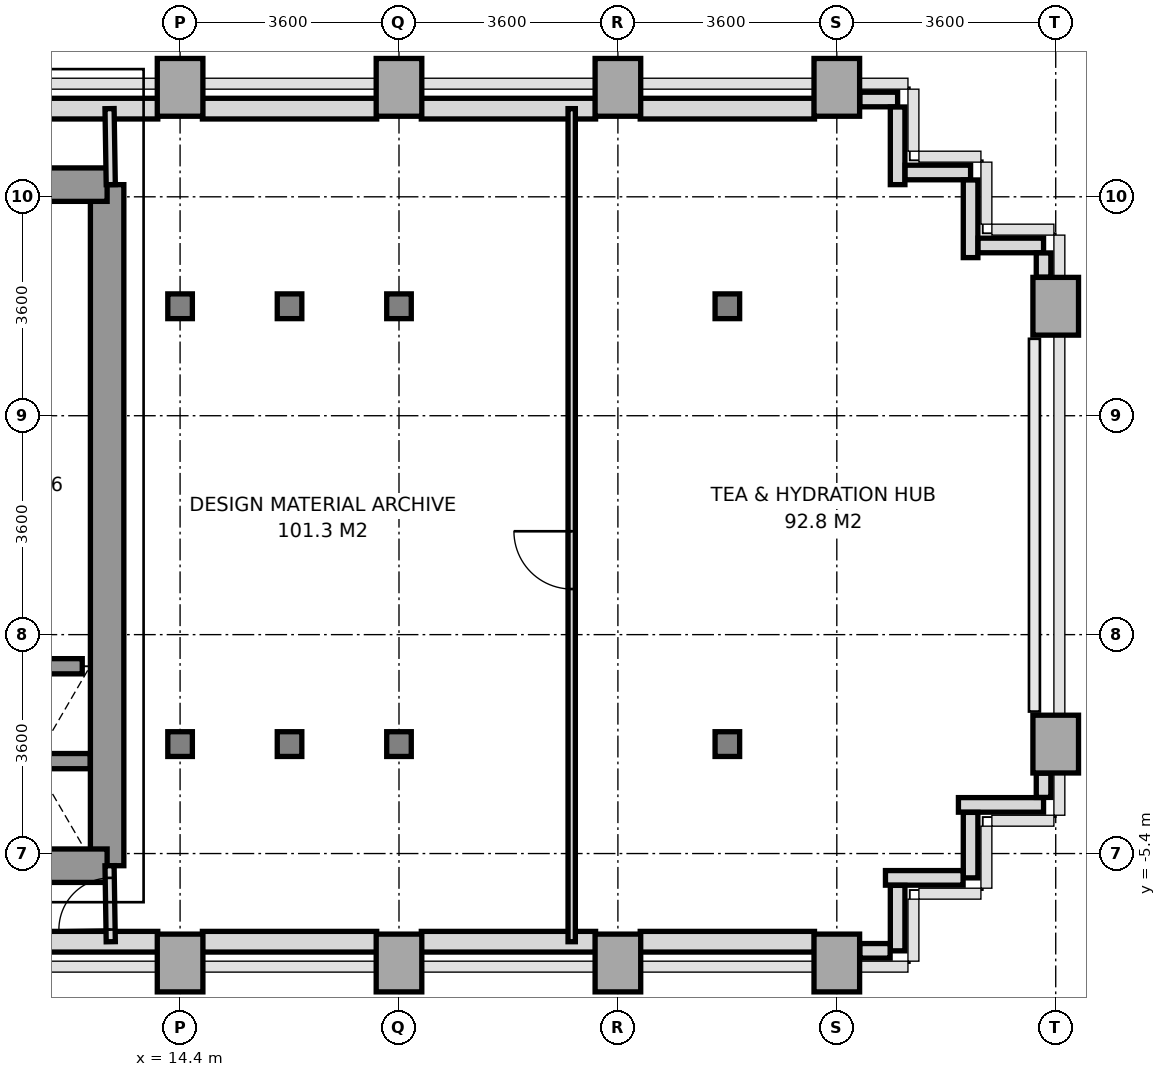
"""IFC4 building model, lengths in metres.
Left out: names, types, materials, properties, quantities, classifications, styles, units other than length and angle.
Written with IfcOpenShell. Run it as: python <this file> out.ifc"""

import sys

from ifc_helpers import new_model, si_unit, direction, frame, frame_2d, origin, origin_2d, place, context, subcontext, project, spatial, rectangle, i_section, extrude, source, transform, mapped, element, fill, save


model = new_model("IFC4")
c1 = context("Model", 3, precision=1e-05, world=origin(), true_north=direction((0.0, 1.0)))
c2 = subcontext(c1, "Body", "Model", "MODEL_VIEW")
j1 = project(units=[si_unit("LENGTHUNIT", "METRE"), si_unit("PLANEANGLEUNIT", "RADIAN")], contexts=[c1])
p1 = place(None, origin())
s1 = spatial("IfcSite", under=j1, at=p1, CompositionType="ELEMENT")
p2 = place(p1, origin())
s2 = spatial("IfcBuilding", under=s1, at=p2, CompositionType="ELEMENT")
p3 = place(p2, frame((0.0, 0.0, 54.4)))
s3 = spatial("IfcBuildingStorey", under=s2, at=p3, CompositionType="ELEMENT", Elevation=54.4)
m1 = source(origin(), c2, "Body", "SweptSolid", [
    extrude(rectangle(XDim=0.75, YDim=0.95, at=origin_2d()), origin(), (0.0, 0.0, 1.0), 3.2),
])
p4 = place(p3, frame((14.4, -7.2, 0.0), z_axis=(0.0, 0.0, 1.0), x_axis=(1.0, 0.0, 0.0)))
e1 = element("IfcColumn", 1, at=p4, inside=s3, PredefinedType="COLUMN", context=c2, shape_type="MappedRepresentation", body=[
    mapped(m1, transform((0.0, 0.0, 0.0), x_axis=(1.0, 0.0, 0.0), y_axis=(0.0, 1.0, 0.0), z_axis=(0.0, 0.0, 1.0), scale=1.0)),
])
m2 = source(origin(), c2, "Body", "SweptSolid", [
    extrude(i_section(OverallWidth=0.404, OverallDepth=0.407, WebThickness=0.022, FlangeThickness=0.035, at=origin_2d()), origin(), (0.0, 0.0, 1.0), 3.2),
])
for number, where, z_axis, x_axis in (
    (2, (14.4, -3.6, 0.0), (0.0, 0.0, 1.0), (1.0, 0.0, 0.0)),
    (3, (14.4, 3.6, 0.0), (0.0, 0.0, 1.0), (1.0, 0.0, 0.0)),
):
    element("IfcColumn", number, at=place(p3, frame(where, z_axis=z_axis, x_axis=x_axis)), inside=s3, PredefinedType="COLUMN", context=c2, shape_type="MappedRepresentation", body=[
        mapped(m2, transform((0.0, 0.0, 0.0), x_axis=(1.0, 0.0, 0.0), y_axis=(0.0, 1.0, 0.0), z_axis=(0.0, 0.0, 1.0), scale=1.0)),
    ])
p5 = place(p3, frame((14.4, 7.2, 0.0), z_axis=(0.0, 0.0, 1.0), x_axis=(1.0, 0.0, 0.0)))
e4 = element("IfcColumn", 4, at=p5, inside=s3, PredefinedType="COLUMN", context=c2, shape_type="MappedRepresentation", body=[
    mapped(m1, transform((0.0, 0.0, 0.0), x_axis=(1.0, 0.0, 0.0), y_axis=(0.0, 1.0, 0.0), z_axis=(0.0, 0.0, 1.0), scale=1.0)),
])
for number, where, z_axis, x_axis in (
    (5, (16.2, -3.6, 0.0), (0.0, 0.0, 1.0), (1.0, 0.0, 0.0)),
    (6, (16.2, 3.6, 0.0), (0.0, 0.0, 1.0), (1.0, 0.0, 0.0)),
):
    element("IfcColumn", number, at=place(p3, frame(where, z_axis=z_axis, x_axis=x_axis)), inside=s3, PredefinedType="COLUMN", context=c2, shape_type="MappedRepresentation", body=[
        mapped(m2, transform((0.0, 0.0, 0.0), x_axis=(1.0, 0.0, 0.0), y_axis=(0.0, 1.0, 0.0), z_axis=(0.0, 0.0, 1.0), scale=1.0)),
    ])
p6 = place(p3, frame((18.0, -7.2, 0.0), z_axis=(0.0, 0.0, 1.0), x_axis=(1.0, 0.0, 0.0)))
e7 = element("IfcColumn", 7, at=p6, inside=s3, PredefinedType="COLUMN", context=c2, shape_type="MappedRepresentation", body=[
    mapped(m1, transform((0.0, 0.0, 0.0), x_axis=(1.0, 0.0, 0.0), y_axis=(0.0, 1.0, 0.0), z_axis=(0.0, 0.0, 1.0), scale=1.0)),
])
for number, where, z_axis, x_axis in (
    (8, (18.0, -3.6, 0.0), (0.0, 0.0, 1.0), (1.0, 0.0, 0.0)),
    (9, (18.0, 3.6, 0.0), (0.0, 0.0, 1.0), (1.0, 0.0, 0.0)),
):
    element("IfcColumn", number, at=place(p3, frame(where, z_axis=z_axis, x_axis=x_axis)), inside=s3, PredefinedType="COLUMN", context=c2, shape_type="MappedRepresentation", body=[
        mapped(m2, transform((0.0, 0.0, 0.0), x_axis=(1.0, 0.0, 0.0), y_axis=(0.0, 1.0, 0.0), z_axis=(0.0, 0.0, 1.0), scale=1.0)),
    ])
for number, where, z_axis, x_axis in (
    (10, (18.0, 7.2, 0.0), (0.0, 0.0, 1.0), (1.0, 0.0, 0.0)),
    (11, (21.6, -7.2, 0.0), (0.0, 0.0, 1.0), (1.0, 0.0, 0.0)),
    (12, (21.6, 7.2, 0.0), (0.0, 0.0, 1.0), (1.0, 0.0, 0.0)),
):
    element("IfcColumn", number, at=place(p3, frame(where, z_axis=z_axis, x_axis=x_axis)), inside=s3, PredefinedType="COLUMN", context=c2, shape_type="MappedRepresentation", body=[
        mapped(m1, transform((0.0, 0.0, 0.0), x_axis=(1.0, 0.0, 0.0), y_axis=(0.0, 1.0, 0.0), z_axis=(0.0, 0.0, 1.0), scale=1.0)),
    ])
for number, where, z_axis, x_axis in (
    (13, (23.4, -3.6, 0.0), (0.0, 0.0, 1.0), (1.0, 0.0, 0.0)),
    (14, (23.4, 3.6, 0.0), (0.0, 0.0, 1.0), (1.0, 0.0, 0.0)),
):
    element("IfcColumn", number, at=place(p3, frame(where, z_axis=z_axis, x_axis=x_axis)), inside=s3, PredefinedType="COLUMN", context=c2, shape_type="MappedRepresentation", body=[
        mapped(m2, transform((0.0, 0.0, 0.0), x_axis=(1.0, 0.0, 0.0), y_axis=(0.0, 1.0, 0.0), z_axis=(0.0, 0.0, 1.0), scale=1.0)),
    ])
for number, where, z_axis, x_axis in (
    (15, (25.2, -7.2, 0.0), (0.0, 0.0, 1.0), (1.0, 0.0, 0.0)),
    (16, (25.2, 7.2, 0.0), (0.0, 0.0, 1.0), (1.0, 0.0, 0.0)),
    (17, (28.8, -3.6, 0.0), (0.0, 0.0, 1.0), (1.0, 0.0, 0.0)),
    (18, (28.8, 3.6, 0.0), (0.0, 0.0, 1.0), (1.0, 0.0, 0.0)),
):
    element("IfcColumn", number, at=place(p3, frame(where, z_axis=z_axis, x_axis=x_axis)), inside=s3, PredefinedType="COLUMN", context=c2, shape_type="MappedRepresentation", body=[
        mapped(m1, transform((0.0, 0.0, 0.0), x_axis=(1.0, 0.0, 0.0), y_axis=(0.0, 1.0, 0.0), z_axis=(0.0, 0.0, 1.0), scale=1.0)),
    ])
p7 = place(p3, frame((11.498, 6.85, 0.0), z_axis=(0.0, 0.0, 1.0), x_axis=(1.0, 0.0, 0.0)))
e19 = element("IfcWall", 19, at=p7, inside=s3, PredefinedType="SOLIDWALL", context=c2, shape_type="SweptSolid", body=[
    extrude(rectangle(XDim=2.535, YDim=0.34, at=frame_2d((1.268, 0.0))), origin(), (0.0, 0.0, 1.0), 3.2),
])
for number, where, z_axis, x_axis in (
    (20, (14.767, 6.85, 0.0), (0.0, 0.0, 1.0), (1.0, 0.0, 0.0)),
    (21, (18.367, 6.85, 0.0), (0.0, 0.0, 1.0), (1.0, 0.0, 0.0)),
    (22, (21.967, 6.85, 0.0), (0.0, 0.0, 1.0), (1.0, 0.0, 0.0)),
):
    element("IfcWall", number, at=place(p3, frame(where, z_axis=z_axis, x_axis=x_axis)), inside=s3, PredefinedType="SOLIDWALL", context=c2, shape_type="SweptSolid", body=[
        extrude(rectangle(XDim=2.866, YDim=0.34, at=frame_2d((1.433, 0.0))), origin(), (0.0, 0.0, 1.0), 2.45),
    ])
p8 = place(p3, frame((11.75, -6.85, 0.0), z_axis=(0.0, 0.0, 1.0), x_axis=(1.0, 0.0, 0.0)))
e23 = element("IfcWall", 23, at=p8, inside=s3, PredefinedType="SOLIDWALL", context=c2, shape_type="SweptSolid", body=[
    extrude(rectangle(XDim=2.283, YDim=0.34, at=frame_2d((1.142, 0.0))), origin(), (0.0, 0.0, 1.0), 3.2),
])
for number, where, z_axis, x_axis in (
    (24, (14.767, -6.85, 0.0), (0.0, 0.0, 1.0), (1.0, 0.0, 0.0)),
    (25, (18.367, -6.85, 0.0), (0.0, 0.0, 1.0), (1.0, 0.0, 0.0)),
    (26, (21.967, -6.85, 0.0), (0.0, 0.0, 1.0), (1.0, 0.0, 0.0)),
):
    element("IfcWall", number, at=place(p3, frame(where, z_axis=z_axis, x_axis=x_axis)), inside=s3, PredefinedType="SOLIDWALL", context=c2, shape_type="SweptSolid", body=[
        extrude(rectangle(XDim=2.866, YDim=0.34, at=frame_2d((1.433, 0.0))), origin(), (0.0, 0.0, 1.0), 2.45),
    ])
p9 = place(p3, frame((28.6, -4.6, 0.0), z_axis=(0.0, 0.0, 1.0), x_axis=(-1.0, 0.0, 0.0)))
e27 = element("IfcWall", 27, at=p9, inside=s3, PredefinedType="PARAPET", context=c2, shape_type="SweptSolid", body=[
    extrude(rectangle(XDim=1.4, YDim=0.24, at=frame_2d((0.7, 0.0))), origin(), (0.0, 0.0, 1.0), 1.15),
])
p10 = place(p3, frame((27.4, -4.723, 0.0), z_axis=(0.0, 0.0, 1.0), x_axis=(0.0, -1.0, 0.0)))
e28 = element("IfcWall", 28, at=p10, inside=s3, PredefinedType="PARAPET", context=c2, shape_type="SweptSolid", body=[
    extrude(rectangle(XDim=1.077, YDim=0.24, at=frame_2d((0.539, 0.0))), origin(), (0.0, 0.0, 1.0), 1.15),
])
p11 = place(p3, frame((27.277, -5.8, 0.0), z_axis=(0.0, 0.0, 1.0), x_axis=(-1.0, 0.0, 0.0)))
e29 = element("IfcWall", 29, at=p11, inside=s3, PredefinedType="PARAPET", context=c2, shape_type="SweptSolid", body=[
    extrude(rectangle(XDim=1.277, YDim=0.24, at=frame_2d((0.639, 0.0))), origin(), (0.0, 0.0, 1.0), 1.15),
])
p12 = place(p3, frame((26.2, -5.923, 0.0), z_axis=(0.0, 0.0, 1.0), x_axis=(0.0, -1.0, 0.0)))
e30 = element("IfcWall", 30, at=p12, inside=s3, PredefinedType="PARAPET", context=c2, shape_type="SweptSolid", body=[
    extrude(rectangle(XDim=1.077, YDim=0.24, at=frame_2d((0.539, 0.0))), origin(), (0.0, 0.0, 1.0), 1.15),
])
p13 = place(p3, frame((26.077, -7.0, 0.0), z_axis=(0.0, 0.0, 1.0), x_axis=(-1.0, 0.0, 0.0)))
e31 = element("IfcWall", 31, at=p13, inside=s3, PredefinedType="PARAPET", context=c2, shape_type="SweptSolid", body=[
    extrude(rectangle(XDim=0.499, YDim=0.24, at=frame_2d((0.25, 0.0))), origin(), (0.0, 0.0, 1.0), 1.15),
])
p14 = place(p3, frame((25.578, 7.0, 0.0), z_axis=(0.0, 0.0, 1.0), x_axis=(1.0, 0.0, 0.0)))
e32 = element("IfcWall", 32, at=p14, inside=s3, PredefinedType="PARAPET", context=c2, shape_type="SweptSolid", body=[
    extrude(rectangle(XDim=0.622, YDim=0.24, at=frame_2d((0.311, 0.0))), origin(), (0.0, 0.0, 1.0), 1.15),
])
p15 = place(p3, frame((26.2, 6.877, 0.0), z_axis=(0.0, 0.0, 1.0), x_axis=(0.0, -1.0, 0.0)))
e33 = element("IfcWall", 33, at=p15, inside=s3, PredefinedType="PARAPET", context=c2, shape_type="SweptSolid", body=[
    extrude(rectangle(XDim=1.277, YDim=0.24, at=frame_2d((0.638, 0.0))), origin(), (0.0, 0.0, 1.0), 1.15),
])
p16 = place(p3, frame((26.323, 5.8, 0.0), z_axis=(0.0, 0.0, 1.0), x_axis=(1.0, 0.0, 0.0)))
e34 = element("IfcWall", 34, at=p16, inside=s3, PredefinedType="PARAPET", context=c2, shape_type="SweptSolid", body=[
    extrude(rectangle(XDim=1.077, YDim=0.24, at=frame_2d((0.539, 0.0))), origin(), (0.0, 0.0, 1.0), 1.15),
])
p17 = place(p3, frame((27.4, 5.677, 0.0), z_axis=(0.0, 0.0, 1.0), x_axis=(0.0, -1.0, 0.0)))
e35 = element("IfcWall", 35, at=p17, inside=s3, PredefinedType="PARAPET", context=c2, shape_type="SweptSolid", body=[
    extrude(rectangle(XDim=1.277, YDim=0.24, at=frame_2d((0.639, 0.0))), origin(), (0.0, 0.0, 1.0), 1.15),
])
p18 = place(p3, frame((27.523, 4.6, 0.0), z_axis=(0.0, 0.0, 1.0), x_axis=(1.0, 0.0, 0.0)))
e36 = element("IfcWall", 36, at=p18, inside=s3, PredefinedType="PARAPET", context=c2, shape_type="SweptSolid", body=[
    extrude(rectangle(XDim=1.077, YDim=0.24, at=frame_2d((0.539, 0.0))), origin(), (0.0, 0.0, 1.0), 1.15),
])
for number, where, z_axis, x_axis in (
    (37, (28.6, 4.477, 0.0), (0.0, 0.0, 1.0), (0.0, -1.0, 0.0)),
    (38, (28.6, -4.078, 0.0), (0.0, 0.0, 1.0), (0.0, -1.0, 0.0)),
):
    element("IfcWall", number, at=place(p3, frame(where, z_axis=z_axis, x_axis=x_axis)), inside=s3, PredefinedType="PARAPET", context=c2, shape_type="SweptSolid", body=[
        extrude(rectangle(XDim=0.399, YDim=0.24, at=frame_2d((0.2, 0.0))), origin(), (0.0, 0.0, 1.0), 1.15),
    ])
p19 = place(p3, frame((13.2, -5.6, 0.0), z_axis=(0.0, 0.0, 1.0), x_axis=(0.0, 1.0, 0.0)))
e39 = element("IfcWall", 39, at=p19, inside=s3, PredefinedType="SHEAR", context=c2, shape_type="SweptSolid", body=[
    extrude(rectangle(XDim=11.2, YDim=0.55, at=frame_2d((5.6, 0.0))), origin(), (0.0, 0.0, 1.0), 3.2),
])
p20 = place(p3, frame((11.381, 5.6, 0.0), z_axis=(0.0, 0.0, 1.0), x_axis=(1.0, 0.0, 0.0)))
e40 = element("IfcWall", 40, at=p20, inside=s3, PredefinedType="SHEAR", context=c2, shape_type="SweptSolid", body=[
    extrude(rectangle(XDim=1.819, YDim=0.55, at=frame_2d((0.909, 0.0))), origin(), (0.0, 0.0, 1.0), 3.2),
])
p21 = place(p3, frame((5.4, -5.6, 0.0), z_axis=(0.0, 0.0, 1.0), x_axis=(1.0, 0.0, 0.0)))
e41 = element("IfcWall", 41, at=p21, inside=s3, PredefinedType="SHEAR", context=c2, shape_type="SweptSolid", body=[
    extrude(rectangle(XDim=7.8, YDim=0.55, at=frame_2d((3.9, 0.0))), origin(), (0.0, 0.0, 1.0), 3.2),
])
p22 = place(p21, frame((3.0, 0.0, 0.0)))
e42 = element("IfcOpeningElement", 42, at=p22, cuts=e41, PredefinedType="OPENING", context=c2, shape_type="SweptSolid", body=[
    extrude(rectangle(XDim=1.2, YDim=2.2, at=frame_2d((0.6, 1.1))), frame((0.0, 0.285, 0.0), z_axis=(0.0, -1.0, 0.0), x_axis=(1.0, 0.0, 0.0)), (0.0, 0.0, 1.0), 0.57),
])
p23 = place(p3, frame((11.08, -3.88, 0.0), z_axis=(0.0, 0.0, 1.0), x_axis=(1.0, 0.0, 0.0)))
e43 = element("IfcWall", 43, at=p23, inside=s3, PredefinedType="SOLIDWALL", context=c2, shape_type="SweptSolid", body=[
    extrude(rectangle(XDim=1.84, YDim=0.25, at=frame_2d((0.92, 0.0))), origin(), (0.0, 0.0, 1.0), 3.2),
])
p24 = place(p3, frame((11.209, -2.32, 0.0), z_axis=(0.0, 0.0, 1.0), x_axis=(1.0, 0.0, 0.0)))
e44 = element("IfcWall", 44, at=p24, inside=s3, PredefinedType="SOLIDWALL", context=c2, shape_type="SweptSolid", body=[
    extrude(rectangle(XDim=1.582, YDim=0.25, at=frame_2d((0.791, 0.0))), origin(), (0.0, 0.0, 1.0), 3.2),
])
p25 = place(p3, frame((13.26, 5.6, 0.0), z_axis=(0.0, 0.0, 1.0), x_axis=(-0.016013571389, 0.999871774545, 0.0)))
e45 = element("IfcWall", 45, at=p25, inside=s3, PredefinedType="PARTITIONING", context=c2, shape_type="SweptSolid", body=[
    extrude(rectangle(XDim=1.25, YDim=0.15, at=frame_2d((0.625, 0.0))), origin(), (0.0, 0.0, 1.0), 3.2),
])
p26 = place(p3, frame((13.26, -6.85, 0.0), z_axis=(0.0, 0.0, 1.0), x_axis=(-0.016013571389, 0.999871774545, 0.0)))
e46 = element("IfcWall", 46, at=p26, inside=s3, PredefinedType="PARTITIONING", context=c2, shape_type="SweptSolid", body=[
    extrude(rectangle(XDim=1.25, YDim=0.15, at=frame_2d((0.625, 0.0))), origin(), (0.0, 0.0, 1.0), 3.2),
])
p27 = place(p26, frame((0.2, 0.0, 0.0)))
e47 = element("IfcOpeningElement", 47, at=p27, cuts=e46, PredefinedType="OPENING", context=c2, shape_type="SweptSolid", body=[
    extrude(rectangle(XDim=0.85, YDim=2.1, at=frame_2d((0.425, 1.05))), frame((0.0, 0.085, 0.0), z_axis=(0.0, -1.0, 0.0), x_axis=(1.0, 0.0, 0.0)), (0.0, 0.0, 1.0), 0.17),
])
p28 = place(p3, frame((20.84, -6.85, 0.0), z_axis=(0.0, 0.0, 1.0), x_axis=(0.0, 1.0, 0.0)))
e48 = element("IfcWall", 48, at=p28, inside=s3, PredefinedType="PARTITIONING", context=c2, shape_type="SweptSolid", body=[
    extrude(rectangle(XDim=13.7, YDim=0.12, at=frame_2d((6.85, 0.0))), origin(), (0.0, 0.0, 1.0), 2.71),
])
p29 = place(p28, frame((5.8, 0.0, 0.0)))
e49 = element("IfcOpeningElement", 49, at=p29, cuts=e48, PredefinedType="OPENING", context=c2, shape_type="SweptSolid", body=[
    extrude(rectangle(XDim=0.95, YDim=2.15, at=frame_2d((0.475, 1.075))), frame((0.0, 0.07, 0.0), z_axis=(0.0, -1.0, 0.0), x_axis=(1.0, 0.0, 0.0)), (0.0, 0.0, 1.0), 0.14),
])
m3 = source(origin(), c2, "Body", "SweptSolid", [
    extrude(rectangle(XDim=0.85, YDim=2.1, at=frame_2d((0.425, 1.05))), frame((0.0, 0.025, 0.0), z_axis=(0.0, -1.0, 0.0), x_axis=(1.0, 0.0, 0.0)), (0.0, 0.0, 1.0), 0.05),
])
p30 = place(p27, origin())
e50 = element("IfcDoor", 50, at=p30, inside=s3, OperationType="SINGLE_SWING_LEFT", PredefinedType="DOOR", context=c2, shape_type="MappedRepresentation", body=[
    mapped(m3, transform((0.0, 0.0, 0.0), x_axis=(1.0, 0.0, 0.0), y_axis=(0.0, 1.0, 0.0), z_axis=(0.0, 0.0, 1.0), scale=1.0)),
])
fill(e47, e50)
m4 = source(origin(), c2, "Body", "SweptSolid", [
    extrude(rectangle(XDim=0.95, YDim=2.15, at=frame_2d((0.475, 1.075))), frame((0.0, 0.025, 0.0), z_axis=(0.0, -1.0, 0.0), x_axis=(1.0, 0.0, 0.0)), (0.0, 0.0, 1.0), 0.05),
])
p31 = place(p29, origin())
e51 = element("IfcDoor", 51, at=p31, inside=s3, OperationType="SINGLE_SWING_RIGHT", PredefinedType="DOOR", context=c2, shape_type="MappedRepresentation", body=[
    mapped(m4, transform((0.0, 0.0, 0.0), x_axis=(1.0, 0.0, 0.0), y_axis=(0.0, 1.0, 0.0), z_axis=(0.0, 0.0, 1.0), scale=1.0)),
])
fill(e49, e51)
save(model, sys.argv[1])
